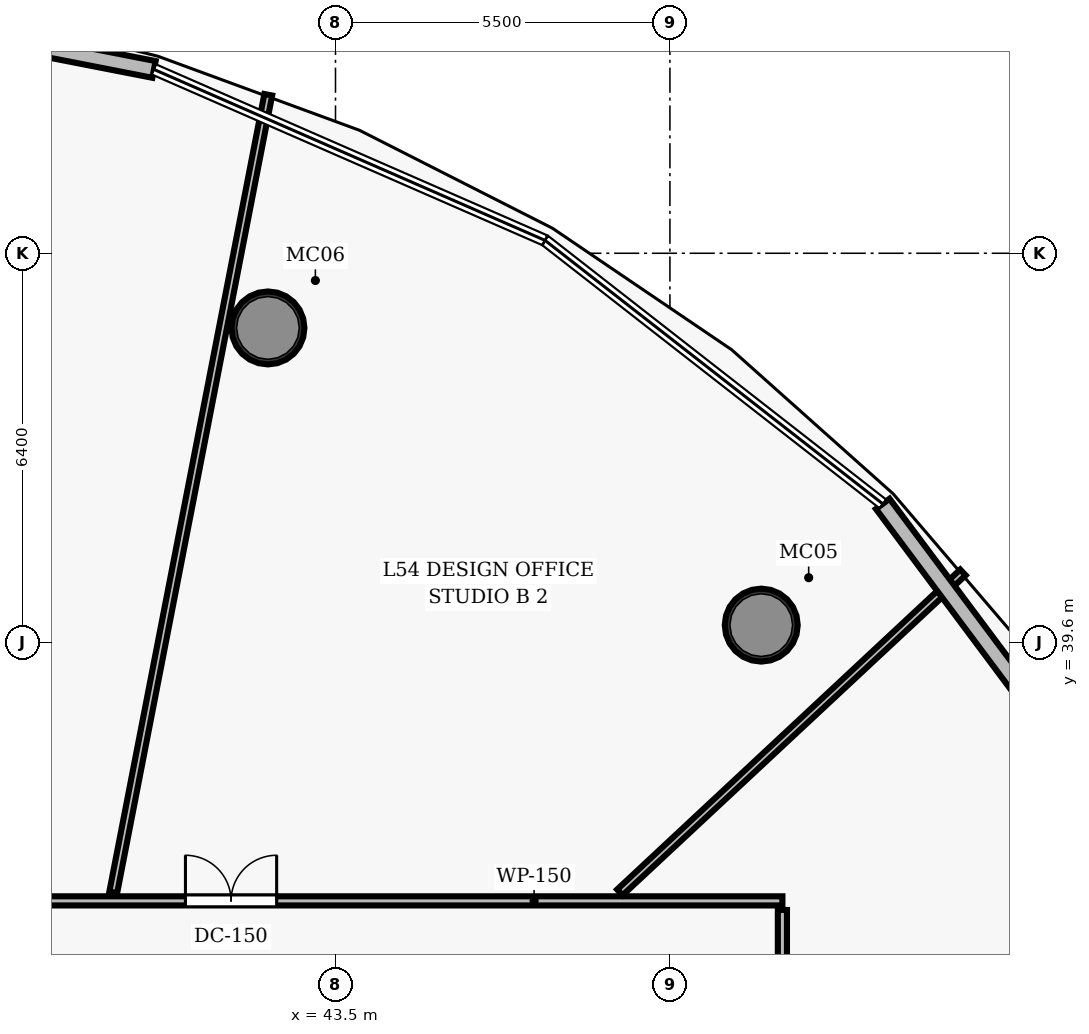
"""IFC4 building model, lengths in metres.
Left out: names, types, materials, properties, quantities, classifications, styles, units other than length and angle.
Written with IfcOpenShell. Run it as: python <this file> out.ifc"""

import sys

from ifc_helpers import new_model, si_unit, direction, frame, frame_2d, origin, origin_2d, place, context, subcontext, project, spatial, rectangle, hollow_circle, extrude, element, fill, save


model = new_model("IFC4")
c1 = context("Model", 3, precision=1e-05, world=origin(), true_north=direction((0.0, 1.0)))
c2 = subcontext(c1, "Body", "Model", "MODEL_VIEW")
j1 = project(units=[si_unit("LENGTHUNIT", "METRE"), si_unit("PLANEANGLEUNIT", "RADIAN")], contexts=[c1])
p1 = place(None, origin())
s1 = spatial("IfcSite", under=j1, at=p1, CompositionType="ELEMENT")
p2 = place(p1, origin())
s2 = spatial("IfcBuilding", under=s1, at=p2, CompositionType="ELEMENT")
p3 = place(p2, frame((0.0, 0.0, 213.55)))
s3 = spatial("IfcBuildingStorey", under=s2, at=p3, CompositionType="ELEMENT", Elevation=213.55)
for number, where, z_axis, x_axis in (
    (1, (50.502, 39.885, 0.0), (0.0, 0.0, 1.0), (1.0, 0.0, 0.0)),
    (2, (42.389, 44.772, 0.0), (0.0, 0.0, 1.0), (1.0, 0.0, 0.0)),
):
    element("IfcColumn", number, at=place(p3, frame(where, z_axis=z_axis, x_axis=x_axis)), inside=s3, PredefinedType="COLUMN", context=c2, shape_type="SweptSolid", body=[
        extrude(hollow_circle(Radius=0.6, WallThickness=0.05, at=origin_2d()), origin(), (0.0, 0.0, 1.0), 3.85),
    ])
p4 = place(p3, frame((24.85, 35.35, 0.0), z_axis=(0.0, 0.0, 1.0), x_axis=(1.0, 0.0, 0.0)))
e3 = element("IfcWall", 3, at=p4, inside=s3, PredefinedType="PARTITIONING", context=c2, shape_type="SweptSolid", body=[
    extrude(rectangle(XDim=26.0, YDim=0.15, at=frame_2d((13.0, 0.0))), origin(), (0.0, 0.0, 1.0), 3.035),
])
p5 = place(p4, frame((16.182, 0.0, 0.0)))
e4 = element("IfcOpeningElement", 4, at=p5, cuts=e3, PredefinedType="OPENING", context=c2, shape_type="SweptSolid", body=[
    extrude(rectangle(XDim=1.5, YDim=2.2, at=frame_2d((0.75, 1.1))), frame((0.0, 0.085, 0.0), z_axis=(0.0, -1.0, 0.0), x_axis=(1.0, 0.0, 0.0)), (0.0, 0.0, 1.0), 0.17),
])
p6 = place(p4, frame((10.36, 0.0, 0.0)))
e5 = element("IfcOpeningElement", 5, at=p6, cuts=e3, PredefinedType="OPENING", context=c2, shape_type="SweptSolid", body=[
    extrude(rectangle(XDim=0.95, YDim=2.15, at=frame_2d((0.475, 1.075))), frame((0.0, 0.085, 0.0), z_axis=(0.0, -1.0, 0.0), x_axis=(1.0, 0.0, 0.0)), (0.0, 0.0, 1.0), 0.17),
])
p7 = place(p4, frame((6.298, 0.0, 0.0)))
e6 = element("IfcOpeningElement", 6, at=p7, cuts=e3, PredefinedType="OPENING", context=c2, shape_type="SweptSolid", body=[
    extrude(rectangle(XDim=0.95, YDim=2.15, at=frame_2d((0.475, 1.075))), frame((0.0, 0.085, 0.0), z_axis=(0.0, -1.0, 0.0), x_axis=(1.0, 0.0, 0.0)), (0.0, 0.0, 1.0), 0.17),
])
p8 = place(p3, frame((50.85, 27.08, 0.0), z_axis=(0.0, 0.0, 1.0), x_axis=(0.0, 1.0, 0.0)))
e7 = element("IfcWall", 7, at=p8, inside=s3, PredefinedType="PARTITIONING", context=c2, shape_type="SweptSolid", body=[
    extrude(rectangle(XDim=8.12, YDim=0.15, at=frame_2d((4.06, 0.0))), origin(), (0.0, 0.0, 1.0), 3.035),
])
p9 = place(p8, frame((1.442, 0.0, 0.0)))
e8 = element("IfcOpeningElement", 8, at=p9, cuts=e7, PredefinedType="OPENING", context=c2, shape_type="SweptSolid", body=[
    extrude(rectangle(XDim=1.5, YDim=2.2, at=frame_2d((0.75, 1.1))), frame((0.0, 0.085, 0.0), z_axis=(0.0, -1.0, 0.0), x_axis=(1.0, 0.0, 0.0)), (0.0, 0.0, 1.0), 0.17),
])
p10 = place(p3, frame((48.177, 35.49, 0.0), z_axis=(0.0, 0.0, 1.0), x_axis=(0.731343539184, 0.682009257777, 0.0)))
e9 = element("IfcWall", 9, at=p10, inside=s3, PredefinedType="PARTITIONING", context=c2, shape_type="SweptSolid", body=[
    extrude(rectangle(XDim=7.715, YDim=0.13, at=frame_2d((3.857, 0.0))), origin(), (0.0, 0.0, 1.0), 3.035),
])
p11 = place(p3, frame((39.845, 35.49, 0.0), z_axis=(0.0, 0.0, 1.0), x_axis=(0.19080412757, 0.981628129641, 0.0)))
e10 = element("IfcWall", 10, at=p11, inside=s3, PredefinedType="PARTITIONING", context=c2, shape_type="SweptSolid", body=[
    extrude(rectangle(XDim=13.362, YDim=0.13, at=frame_2d((6.681, 0.0))), origin(), (0.0, 0.0, 1.0), 3.035),
])
p12 = place(p3, frame((52.5, 41.879, 0.0), z_axis=(0.0, 0.0, 1.0), x_axis=(0.598368729924, -0.801220857847, 0.0)))
e11 = element("IfcWall", 11, at=p12, inside=s3, PredefinedType="SOLIDWALL", context=c2, shape_type="SweptSolid", body=[
    extrude(rectangle(XDim=7.045, YDim=0.28, at=frame_2d((3.523, 0.0))), origin(), (0.0, 0.0, 1.0), 3.62),
])
p13 = place(p3, frame((33.856, 50.323, 0.0), z_axis=(0.0, 0.0, 1.0), x_axis=(0.981469964999, -0.191616042662, 0.0)))
e12 = element("IfcWall", 12, at=p13, inside=s3, PredefinedType="SOLIDWALL", context=c2, shape_type="SweptSolid", body=[
    extrude(rectangle(XDim=6.785, YDim=0.28, at=frame_2d((3.392, 0.0))), origin(), (0.0, 0.0, 1.0), 3.62),
])
p14 = place(p5, origin())
e13 = element("IfcDoor", 13, at=p14, inside=s3, OperationType="DOUBLE_DOOR_SINGLE_SWING", PredefinedType="DOOR", context=c2, shape_type="SweptSolid", body=[
    extrude(rectangle(XDim=1.5, YDim=2.2, at=frame_2d((0.75, 1.1))), frame((0.0, 0.025, 0.0), z_axis=(0.0, -1.0, 0.0), x_axis=(1.0, 0.0, 0.0)), (0.0, 0.0, 1.0), 0.05),
])
fill(e4, e13)
save(model, sys.argv[1])
